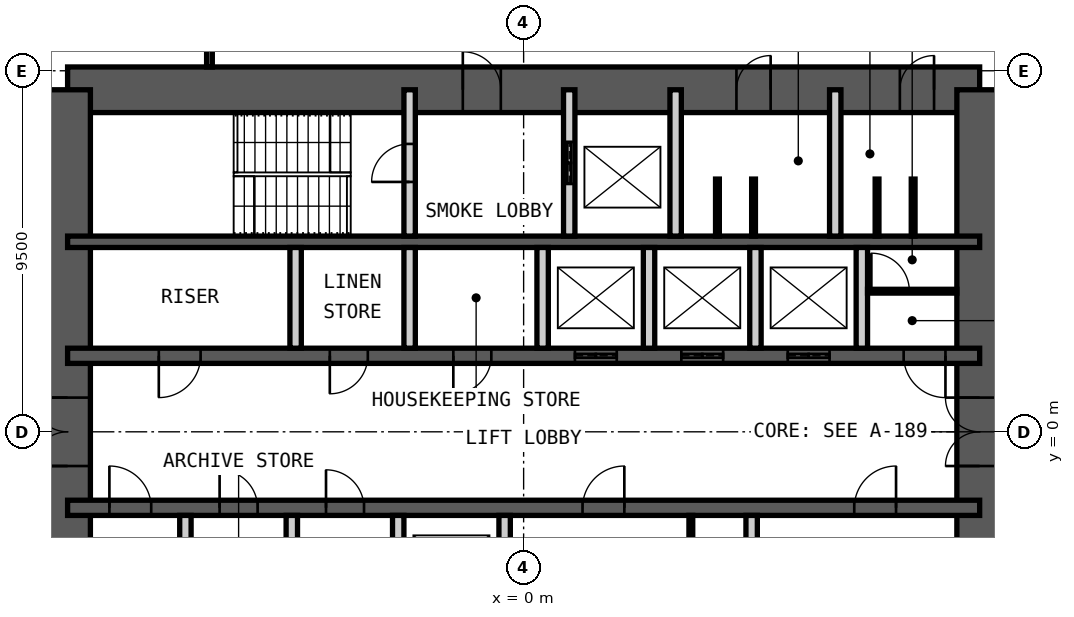
"""IFC4 building model, lengths in metres.
Left out: names, types, materials, properties, quantities, classifications, styles, units other than length and angle.
Written with IfcOpenShell. Run it as: python <this file> out.ifc"""

import sys

from ifc_helpers import new_model, si_unit, direction, frame, frame_2d, origin, place, context, subcontext, project, spatial, rectangle, extrude, element, fill, save


model = new_model("IFC4")
c1 = context("Model", 3, precision=1e-05, world=origin(), true_north=direction((0.0, 1.0)))
c2 = subcontext(c1, "Body", "Model", "MODEL_VIEW")
j1 = project(units=[si_unit("LENGTHUNIT", "METRE"), si_unit("PLANEANGLEUNIT", "RADIAN")], contexts=[c1])
p1 = place(None, origin())
s1 = spatial("IfcSite", under=j1, at=p1, CompositionType="ELEMENT")
p2 = place(p1, origin())
s2 = spatial("IfcBuilding", under=s1, at=p2, CompositionType="ELEMENT")
p3 = place(p2, frame((0.0, 0.0, 230.8)))
s3 = spatial("IfcBuildingStorey", under=s2, at=p3, CompositionType="ELEMENT", Elevation=230.8)
p4 = place(p3, frame((-12.0, 9.0, 0.0), z_axis=(0.0, 0.0, 1.0), x_axis=(1.0, 0.0, 0.0)))
e1 = element("IfcWall", 1, at=p4, inside=s3, PredefinedType="SHEAR", context=c2, shape_type="SweptSolid", body=[
    extrude(rectangle(XDim=24.0, YDim=1.2, at=frame_2d((12.0, 0.0))), origin(), (0.0, 0.0, 1.0), 4.2),
])
p5 = place(p4, frame((10.4, 0.0, 0.0)))
e2 = element("IfcOpeningElement", 2, at=p5, cuts=e1, PredefinedType="OPENING", context=c2, shape_type="SweptSolid", body=[
    extrude(rectangle(XDim=1.0, YDim=2.1, at=frame_2d((0.5, 1.05))), frame((0.0, 0.61, 0.0), z_axis=(0.0, -1.0, 0.0), x_axis=(1.0, 0.0, 0.0)), (0.0, 0.0, 1.0), 1.22),
])
p6 = place(p4, frame((17.6, 0.0, 0.0)))
e3 = element("IfcOpeningElement", 3, at=p6, cuts=e1, PredefinedType="OPENING", context=c2, shape_type="SweptSolid", body=[
    extrude(rectangle(XDim=0.9, YDim=2.1, at=frame_2d((0.45, 1.05))), frame((0.0, 0.61, 0.0), z_axis=(0.0, -1.0, 0.0), x_axis=(1.0, 0.0, 0.0)), (0.0, 0.0, 1.0), 1.22),
])
p7 = place(p4, frame((21.9, 0.0, 0.0)))
e4 = element("IfcOpeningElement", 4, at=p7, cuts=e1, PredefinedType="OPENING", context=c2, shape_type="SweptSolid", body=[
    extrude(rectangle(XDim=0.9, YDim=2.1, at=frame_2d((0.45, 1.05))), frame((0.0, 0.61, 0.0), z_axis=(0.0, -1.0, 0.0), x_axis=(1.0, 0.0, 0.0)), (0.0, 0.0, 1.0), 1.22),
])
p8 = place(p3, frame((12.0, -9.0, 0.0), z_axis=(0.0, 0.0, 1.0), x_axis=(0.0, 1.0, 0.0)))
e5 = element("IfcWall", 5, at=p8, inside=s3, PredefinedType="SHEAR", context=c2, shape_type="SweptSolid", body=[
    extrude(rectangle(XDim=18.0, YDim=1.2, at=frame_2d((9.0, 0.0))), origin(), (0.0, 0.0, 1.0), 4.2),
])
p9 = place(p8, frame((8.1, 0.0, 0.0)))
e6 = element("IfcOpeningElement", 6, at=p9, cuts=e5, PredefinedType="OPENING", context=c2, shape_type="SweptSolid", body=[
    extrude(rectangle(XDim=1.8, YDim=2.1, at=frame_2d((0.9, 1.05))), frame((0.0, 0.61, 0.0), z_axis=(0.0, -1.0, 0.0), x_axis=(1.0, 0.0, 0.0)), (0.0, 0.0, 1.0), 1.22),
])
p10 = place(p3, frame((-12.0, -9.0, 0.0), z_axis=(0.0, 0.0, 1.0), x_axis=(0.0, 1.0, 0.0)))
e7 = element("IfcWall", 7, at=p10, inside=s3, PredefinedType="SHEAR", context=c2, shape_type="SweptSolid", body=[
    extrude(rectangle(XDim=18.0, YDim=1.2, at=frame_2d((9.0, 0.0))), origin(), (0.0, 0.0, 1.0), 4.2),
])
p11 = place(p10, frame((8.1, 0.0, 0.0)))
e8 = element("IfcOpeningElement", 8, at=p11, cuts=e7, PredefinedType="OPENING", context=c2, shape_type="SweptSolid", body=[
    extrude(rectangle(XDim=1.8, YDim=2.1, at=frame_2d((0.9, 1.05))), frame((0.0, 0.61, 0.0), z_axis=(0.0, -1.0, 0.0), x_axis=(1.0, 0.0, 0.0)), (0.0, 0.0, 1.0), 1.22),
])
p12 = place(p3, frame((-12.0, 5.0, 0.0), z_axis=(0.0, 0.0, 1.0), x_axis=(1.0, 0.0, 0.0)))
e9 = element("IfcWall", 9, at=p12, inside=s3, PredefinedType="SHEAR", context=c2, shape_type="SweptSolid", body=[
    extrude(rectangle(XDim=24.0, YDim=0.3, at=frame_2d((12.0, 0.0))), origin(), (0.0, 0.0, 1.0), 4.2),
])
p13 = place(p3, frame((-12.0, 2.0, 0.0), z_axis=(0.0, 0.0, 1.0), x_axis=(1.0, 0.0, 0.0)))
e10 = element("IfcWall", 10, at=p13, inside=s3, PredefinedType="SHEAR", context=c2, shape_type="SweptSolid", body=[
    extrude(rectangle(XDim=24.0, YDim=0.4, at=frame_2d((12.0, 0.0))), origin(), (0.0, 0.0, 1.0), 4.2),
])
p14 = place(p13, frame((2.4, 0.0, 0.0)))
e11 = element("IfcOpeningElement", 11, at=p14, cuts=e10, PredefinedType="OPENING", context=c2, shape_type="SweptSolid", body=[
    extrude(rectangle(XDim=1.1, YDim=2.1, at=frame_2d((0.55, 1.05))), frame((0.0, 0.21, 0.0), z_axis=(0.0, -1.0, 0.0), x_axis=(1.0, 0.0, 0.0)), (0.0, 0.0, 1.0), 0.42),
])
p15 = place(p13, frame((22.0, 0.0, 0.0)))
e12 = element("IfcOpeningElement", 12, at=p15, cuts=e10, PredefinedType="OPENING", context=c2, shape_type="SweptSolid", body=[
    extrude(rectangle(XDim=1.1, YDim=2.1, at=frame_2d((0.55, 1.05))), frame((0.0, 0.21, 0.0), z_axis=(0.0, -1.0, 0.0), x_axis=(1.0, 0.0, 0.0)), (0.0, 0.0, 1.0), 0.42),
])
p16 = place(p13, frame((10.15, 0.0, 0.0)))
e13 = element("IfcOpeningElement", 13, at=p16, cuts=e10, PredefinedType="OPENING", context=c2, shape_type="SweptSolid", body=[
    extrude(rectangle(XDim=1.0, YDim=2.1, at=frame_2d((0.5, 1.05))), frame((0.0, 0.21, 0.0), z_axis=(0.0, -1.0, 0.0), x_axis=(1.0, 0.0, 0.0)), (0.0, 0.0, 1.0), 0.42),
])
p17 = place(p13, frame((6.9, 0.0, 0.0)))
e14 = element("IfcOpeningElement", 14, at=p17, cuts=e10, PredefinedType="OPENING", context=c2, shape_type="SweptSolid", body=[
    extrude(rectangle(XDim=1.0, YDim=2.1, at=frame_2d((0.5, 1.05))), frame((0.0, 0.21, 0.0), z_axis=(0.0, -1.0, 0.0), x_axis=(1.0, 0.0, 0.0)), (0.0, 0.0, 1.0), 0.42),
])
p18 = place(p13, frame((13.35, 0.0, 0.0)))
e15 = element("IfcOpeningElement", 15, at=p18, cuts=e10, PredefinedType="OPENING", context=c2, shape_type="SweptSolid", body=[
    extrude(rectangle(XDim=1.1, YDim=2.4, at=frame_2d((0.55, 1.2))), frame((0.0, 0.21, 0.0), z_axis=(0.0, -1.0, 0.0), x_axis=(1.0, 0.0, 0.0)), (0.0, 0.0, 1.0), 0.42),
])
p19 = place(p13, frame((16.15, 0.0, 0.0)))
e16 = element("IfcOpeningElement", 16, at=p19, cuts=e10, PredefinedType="OPENING", context=c2, shape_type="SweptSolid", body=[
    extrude(rectangle(XDim=1.1, YDim=2.4, at=frame_2d((0.55, 1.2))), frame((0.0, 0.21, 0.0), z_axis=(0.0, -1.0, 0.0), x_axis=(1.0, 0.0, 0.0)), (0.0, 0.0, 1.0), 0.42),
])
p20 = place(p13, frame((18.95, 0.0, 0.0)))
e17 = element("IfcOpeningElement", 17, at=p20, cuts=e10, PredefinedType="OPENING", context=c2, shape_type="SweptSolid", body=[
    extrude(rectangle(XDim=1.1, YDim=2.4, at=frame_2d((0.55, 1.2))), frame((0.0, 0.21, 0.0), z_axis=(0.0, -1.0, 0.0), x_axis=(1.0, 0.0, 0.0)), (0.0, 0.0, 1.0), 0.42),
])
p21 = place(p3, frame((-12.0, -2.0, 0.0), z_axis=(0.0, 0.0, 1.0), x_axis=(1.0, 0.0, 0.0)))
e18 = element("IfcWall", 18, at=p21, inside=s3, PredefinedType="SHEAR", context=c2, shape_type="SweptSolid", body=[
    extrude(rectangle(XDim=24.0, YDim=0.4, at=frame_2d((12.0, 0.0))), origin(), (0.0, 0.0, 1.0), 4.2),
])
p22 = place(p21, frame((1.1, 0.0, 0.0)))
e19 = element("IfcOpeningElement", 19, at=p22, cuts=e18, PredefinedType="OPENING", context=c2, shape_type="SweptSolid", body=[
    extrude(rectangle(XDim=1.1, YDim=2.1, at=frame_2d((0.55, 1.05))), frame((0.0, 0.21, 0.0), z_axis=(0.0, -1.0, 0.0), x_axis=(1.0, 0.0, 0.0)), (0.0, 0.0, 1.0), 0.42),
])
p23 = place(p21, frame((13.55, 0.0, 0.0)))
e20 = element("IfcOpeningElement", 20, at=p23, cuts=e18, PredefinedType="OPENING", context=c2, shape_type="SweptSolid", body=[
    extrude(rectangle(XDim=1.1, YDim=2.1, at=frame_2d((0.55, 1.05))), frame((0.0, 0.21, 0.0), z_axis=(0.0, -1.0, 0.0), x_axis=(1.0, 0.0, 0.0)), (0.0, 0.0, 1.0), 0.42),
])
p24 = place(p21, frame((20.7, 0.0, 0.0)))
e21 = element("IfcOpeningElement", 21, at=p24, cuts=e18, PredefinedType="OPENING", context=c2, shape_type="SweptSolid", body=[
    extrude(rectangle(XDim=1.1, YDim=2.1, at=frame_2d((0.55, 1.05))), frame((0.0, 0.21, 0.0), z_axis=(0.0, -1.0, 0.0), x_axis=(1.0, 0.0, 0.0)), (0.0, 0.0, 1.0), 0.42),
])
p25 = place(p21, frame((4.0, 0.0, 0.0)))
e22 = element("IfcOpeningElement", 22, at=p25, cuts=e18, PredefinedType="OPENING", context=c2, shape_type="SweptSolid", body=[
    extrude(rectangle(XDim=1.0, YDim=2.1, at=frame_2d((0.5, 1.05))), frame((0.0, 0.21, 0.0), z_axis=(0.0, -1.0, 0.0), x_axis=(1.0, 0.0, 0.0)), (0.0, 0.0, 1.0), 0.42),
])
p26 = place(p21, frame((6.8, 0.0, 0.0)))
e23 = element("IfcOpeningElement", 23, at=p26, cuts=e18, PredefinedType="OPENING", context=c2, shape_type="SweptSolid", body=[
    extrude(rectangle(XDim=1.0, YDim=2.1, at=frame_2d((0.5, 1.05))), frame((0.0, 0.21, 0.0), z_axis=(0.0, -1.0, 0.0), x_axis=(1.0, 0.0, 0.0)), (0.0, 0.0, 1.0), 0.42),
])
p27 = place(p3, frame((-3.0, 5.15, 0.0), z_axis=(0.0, 0.0, 1.0), x_axis=(0.0, 1.0, 0.0)))
e24 = element("IfcWall", 24, at=p27, inside=s3, PredefinedType="PARTITIONING", context=c2, shape_type="SweptSolid", body=[
    extrude(rectangle(XDim=3.85, YDim=0.3, at=frame_2d((1.925, 0.0))), origin(), (0.0, 0.0, 1.0), 3.98),
])
p28 = place(p27, frame((1.425, 0.0, 0.0)))
e25 = element("IfcOpeningElement", 25, at=p28, cuts=e24, PredefinedType="OPENING", context=c2, shape_type="SweptSolid", body=[
    extrude(rectangle(XDim=1.0, YDim=2.1, at=frame_2d((0.5, 1.05))), frame((0.0, 0.16, 0.0), z_axis=(0.0, -1.0, 0.0), x_axis=(1.0, 0.0, 0.0)), (0.0, 0.0, 1.0), 0.32),
])
p29 = place(p3, frame((1.2, 5.15, 0.0), z_axis=(0.0, 0.0, 1.0), x_axis=(0.0, 1.0, 0.0)))
e26 = element("IfcWall", 26, at=p29, inside=s3, PredefinedType="PARTITIONING", context=c2, shape_type="SweptSolid", body=[
    extrude(rectangle(XDim=3.85, YDim=0.3, at=frame_2d((1.925, 0.0))), origin(), (0.0, 0.0, 1.0), 3.98),
])
p30 = place(p29, frame((1.375, 0.0, 0.0)))
e27 = element("IfcOpeningElement", 27, at=p30, cuts=e26, PredefinedType="OPENING", context=c2, shape_type="SweptSolid", body=[
    extrude(rectangle(XDim=1.1, YDim=2.4, at=frame_2d((0.55, 1.2))), frame((0.0, 0.16, 0.0), z_axis=(0.0, -1.0, 0.0), x_axis=(1.0, 0.0, 0.0)), (0.0, 0.0, 1.0), 0.32),
])
for number, where, z_axis, x_axis in (
    (28, (4.0, 5.15, 0.0), (0.0, 0.0, 1.0), (0.0, 1.0, 0.0)),
    (29, (8.2, 5.15, 0.0), (0.0, 0.0, 1.0), (0.0, 1.0, 0.0)),
):
    element("IfcWall", number, at=place(p3, frame(where, z_axis=z_axis, x_axis=x_axis)), inside=s3, PredefinedType="PARTITIONING", context=c2, shape_type="SweptSolid", body=[
        extrude(rectangle(XDim=3.85, YDim=0.3, at=frame_2d((1.925, 0.0))), origin(), (0.0, 0.0, 1.0), 3.98),
    ])
for number, where, z_axis, x_axis in (
    (30, (-6.0, 2.2, 0.0), (0.0, 0.0, 1.0), (0.0, 1.0, 0.0)),
    (31, (-3.0, 2.2, 0.0), (0.0, 0.0, 1.0), (0.0, 1.0, 0.0)),
    (32, (0.5, 2.2, 0.0), (0.0, 0.0, 1.0), (0.0, 1.0, 0.0)),
    (33, (3.3, 2.2, 0.0), (0.0, 0.0, 1.0), (0.0, 1.0, 0.0)),
    (34, (6.1, 2.2, 0.0), (0.0, 0.0, 1.0), (0.0, 1.0, 0.0)),
    (35, (8.9, 2.2, 0.0), (0.0, 0.0, 1.0), (0.0, 1.0, 0.0)),
    (36, (-8.9, -4.85, 0.0), (0.0, 0.0, 1.0), (0.0, 1.0, 0.0)),
    (37, (-6.1, -4.85, 0.0), (0.0, 0.0, 1.0), (0.0, 1.0, 0.0)),
    (38, (-3.3, -4.85, 0.0), (0.0, 0.0, 1.0), (0.0, 1.0, 0.0)),
    (39, (-0.5, -4.85, 0.0), (0.0, 0.0, 1.0), (0.0, 1.0, 0.0)),
    (40, (6.0, -4.85, 0.0), (0.0, 0.0, 1.0), (0.0, 1.0, 0.0)),
):
    element("IfcWall", number, at=place(p3, frame(where, z_axis=z_axis, x_axis=x_axis)), inside=s3, PredefinedType="PARTITIONING", context=c2, shape_type="SweptSolid", body=[
        extrude(rectangle(XDim=2.65, YDim=0.3, at=frame_2d((1.325, 0.0))), origin(), (0.0, 0.0, 1.0), 3.98),
    ])
p31 = place(p3, frame((4.4, -4.85, 0.0), z_axis=(0.0, 0.0, 1.0), x_axis=(0.0, 1.0, 0.0)))
e41 = element("IfcWall", 41, at=p31, inside=s3, PredefinedType="PARTITIONING", context=c2, shape_type="SweptSolid", body=[
    extrude(rectangle(XDim=2.65, YDim=0.1, at=frame_2d((1.325, 0.0))), origin(), (0.0, 0.0, 1.0), 3.98),
])
p32 = place(p31, frame((0.1, 0.0, 0.0)))
e42 = element("IfcOpeningElement", 42, at=p32, cuts=e41, PredefinedType="OPENING", context=c2, shape_type="SweptSolid", body=[
    extrude(rectangle(XDim=1.0, YDim=2.4, at=frame_2d((0.5, 1.2))), frame((0.0, 0.06, 0.0), z_axis=(0.0, -1.0, 0.0), x_axis=(1.0, 0.0, 0.0)), (0.0, 0.0, 1.0), 0.12),
])
p33 = place(p3, frame((9.05, 3.7, 0.0), z_axis=(0.0, 0.0, 1.0), x_axis=(1.0, 0.0, 0.0)))
e43 = element("IfcWall", 43, at=p33, inside=s3, PredefinedType="PARTITIONING", context=c2, shape_type="SweptSolid", body=[
    extrude(rectangle(XDim=2.35, YDim=0.1, at=frame_2d((1.175, 0.0))), origin(), (0.0, 0.0, 1.0), 3.98),
])
p34 = place(p33, frame((0.1, 0.0, 0.0)))
e44 = element("IfcOpeningElement", 44, at=p34, cuts=e43, PredefinedType="OPENING", context=c2, shape_type="SweptSolid", body=[
    extrude(rectangle(XDim=1.0, YDim=2.4, at=frame_2d((0.5, 1.2))), frame((0.0, 0.06, 0.0), z_axis=(0.0, -1.0, 0.0), x_axis=(1.0, 0.0, 0.0)), (0.0, 0.0, 1.0), 0.12),
])
for number, where, z_axis, x_axis in (
    (45, (5.1, 5.15, 0.0), (0.0, 0.0, 1.0), (0.0, 1.0, 0.0)),
    (46, (6.05, 5.15, 0.0), (0.0, 0.0, 1.0), (0.0, 1.0, 0.0)),
    (47, (9.3, 5.15, 0.0), (0.0, 0.0, 1.0), (0.0, 1.0, 0.0)),
    (48, (10.25, 5.15, 0.0), (0.0, 0.0, 1.0), (0.0, 1.0, 0.0)),
):
    element("IfcWall", number, at=place(p3, frame(where, z_axis=z_axis, x_axis=x_axis)), inside=s3, PredefinedType="PARTITIONING", context=c2, shape_type="SweptSolid", body=[
        extrude(rectangle(XDim=1.5, YDim=0.1, at=frame_2d((0.75, 0.0))), origin(), (0.0, 0.0, 1.0), 2.1),
    ])
p35 = place(p3, frame((-8.267, 9.6, 0.0), z_axis=(0.0, 0.0, 1.0), x_axis=(0.0, 1.0, 0.0)))
e49 = element("IfcWall", 49, at=p35, inside=s3, PredefinedType="PARTITIONING", context=c2, shape_type="SweptSolid", body=[
    extrude(rectangle(XDim=1.875, YDim=0.15, at=frame_2d((0.938, 0.0))), origin(), (0.0, 0.0, 1.0), 4.03),
])
p36 = place(p5, origin())
e50 = element("IfcDoor", 50, at=p36, inside=s3, OperationType="SINGLE_SWING_RIGHT", PredefinedType="DOOR", context=c2, shape_type="SweptSolid", body=[
    extrude(rectangle(XDim=1.0, YDim=2.1, at=frame_2d((0.5, 1.05))), frame((0.0, 0.025, 0.0), z_axis=(0.0, -1.0, 0.0), x_axis=(1.0, 0.0, 0.0)), (0.0, 0.0, 1.0), 0.05),
])
fill(e2, e50)
p37 = place(p6, origin())
e51 = element("IfcDoor", 51, at=p37, inside=s3, OperationType="SINGLE_SWING_LEFT", PredefinedType="DOOR", context=c2, shape_type="SweptSolid", body=[
    extrude(rectangle(XDim=0.9, YDim=2.1, at=frame_2d((0.45, 1.05))), frame((0.0, 0.025, 0.0), z_axis=(0.0, -1.0, 0.0), x_axis=(1.0, 0.0, 0.0)), (0.0, 0.0, 1.0), 0.05),
])
fill(e3, e51)
p38 = place(p7, origin())
e52 = element("IfcDoor", 52, at=p38, inside=s3, OperationType="SINGLE_SWING_LEFT", PredefinedType="DOOR", context=c2, shape_type="SweptSolid", body=[
    extrude(rectangle(XDim=0.9, YDim=2.1, at=frame_2d((0.45, 1.05))), frame((0.0, 0.025, 0.0), z_axis=(0.0, -1.0, 0.0), x_axis=(1.0, 0.0, 0.0)), (0.0, 0.0, 1.0), 0.05),
])
fill(e4, e52)
p39 = place(p28, origin())
e53 = element("IfcDoor", 53, at=p39, inside=s3, OperationType="SINGLE_SWING_RIGHT", PredefinedType="DOOR", context=c2, shape_type="SweptSolid", body=[
    extrude(rectangle(XDim=1.0, YDim=2.1, at=frame_2d((0.5, 1.05))), frame((0.0, 0.025, 0.0), z_axis=(0.0, -1.0, 0.0), x_axis=(1.0, 0.0, 0.0)), (0.0, 0.0, 1.0), 0.05),
])
fill(e25, e53)
p40 = place(p14, origin())
e54 = element("IfcDoor", 54, at=p40, inside=s3, OperationType="SINGLE_SWING_LEFT", PredefinedType="DOOR", context=c2, shape_type="SweptSolid", body=[
    extrude(rectangle(XDim=1.1, YDim=2.1, at=frame_2d((0.55, 1.05))), frame((0.0, 0.025, 0.0), z_axis=(0.0, -1.0, 0.0), x_axis=(1.0, 0.0, 0.0)), (0.0, 0.0, 1.0), 0.05),
])
fill(e11, e54)
p41 = place(p22, origin())
e55 = element("IfcDoor", 55, at=p41, inside=s3, OperationType="SINGLE_SWING_RIGHT", PredefinedType="DOOR", context=c2, shape_type="SweptSolid", body=[
    extrude(rectangle(XDim=1.1, YDim=2.1, at=frame_2d((0.55, 1.05))), frame((0.0, 0.025, 0.0), z_axis=(0.0, -1.0, 0.0), x_axis=(1.0, 0.0, 0.0)), (0.0, 0.0, 1.0), 0.05),
])
fill(e19, e55)
p42 = place(p15, origin())
e56 = element("IfcDoor", 56, at=p42, inside=s3, OperationType="SINGLE_SWING_RIGHT", PredefinedType="DOOR", context=c2, shape_type="SweptSolid", body=[
    extrude(rectangle(XDim=1.1, YDim=2.1, at=frame_2d((0.55, 1.05))), frame((0.0, 0.025, 0.0), z_axis=(0.0, -1.0, 0.0), x_axis=(1.0, 0.0, 0.0)), (0.0, 0.0, 1.0), 0.05),
])
fill(e12, e56)
p43 = place(p16, origin())
e57 = element("IfcDoor", 57, at=p43, inside=s3, OperationType="SINGLE_SWING_LEFT", PredefinedType="DOOR", context=c2, shape_type="SweptSolid", body=[
    extrude(rectangle(XDim=1.0, YDim=2.1, at=frame_2d((0.5, 1.05))), frame((0.0, 0.025, 0.0), z_axis=(0.0, -1.0, 0.0), x_axis=(1.0, 0.0, 0.0)), (0.0, 0.0, 1.0), 0.05),
])
fill(e13, e57)
p44 = place(p23, origin())
e58 = element("IfcDoor", 58, at=p44, inside=s3, OperationType="SINGLE_SWING_LEFT", PredefinedType="DOOR", context=c2, shape_type="SweptSolid", body=[
    extrude(rectangle(XDim=1.1, YDim=2.1, at=frame_2d((0.55, 1.05))), frame((0.0, 0.025, 0.0), z_axis=(0.0, -1.0, 0.0), x_axis=(1.0, 0.0, 0.0)), (0.0, 0.0, 1.0), 0.05),
])
fill(e20, e58)
p45 = place(p24, origin())
e59 = element("IfcDoor", 59, at=p45, inside=s3, OperationType="SINGLE_SWING_LEFT", PredefinedType="DOOR", context=c2, shape_type="SweptSolid", body=[
    extrude(rectangle(XDim=1.1, YDim=2.1, at=frame_2d((0.55, 1.05))), frame((0.0, 0.025, 0.0), z_axis=(0.0, -1.0, 0.0), x_axis=(1.0, 0.0, 0.0)), (0.0, 0.0, 1.0), 0.05),
])
fill(e21, e59)
p46 = place(p9, origin())
e60 = element("IfcDoor", 60, at=p46, inside=s3, OperationType="DOUBLE_DOOR_DOUBLE_SWING", PredefinedType="DOOR", context=c2, shape_type="SweptSolid", body=[
    extrude(rectangle(XDim=1.8, YDim=2.1, at=frame_2d((0.9, 1.05))), frame((0.0, 0.025, 0.0), z_axis=(0.0, -1.0, 0.0), x_axis=(1.0, 0.0, 0.0)), (0.0, 0.0, 1.0), 0.05),
])
fill(e6, e60)
p47 = place(p11, origin())
e61 = element("IfcDoor", 61, at=p47, inside=s3, OperationType="DOUBLE_DOOR_DOUBLE_SWING", PredefinedType="DOOR", context=c2, shape_type="SweptSolid", body=[
    extrude(rectangle(XDim=1.8, YDim=2.1, at=frame_2d((0.9, 1.05))), frame((0.0, 0.025, 0.0), z_axis=(0.0, -1.0, 0.0), x_axis=(1.0, 0.0, 0.0)), (0.0, 0.0, 1.0), 0.05),
])
fill(e8, e61)
p48 = place(p30, origin())
e62 = element("IfcDoor", 62, at=p48, inside=s3, OperationType="DOUBLE_DOOR_SLIDING", PredefinedType="DOOR", context=c2, shape_type="SweptSolid", body=[
    extrude(rectangle(XDim=1.1, YDim=2.4, at=frame_2d((0.55, 1.2))), frame((0.0, 0.025, 0.0), z_axis=(0.0, -1.0, 0.0), x_axis=(1.0, 0.0, 0.0)), (0.0, 0.0, 1.0), 0.05),
])
fill(e27, e62)
p49 = place(p17, origin())
e63 = element("IfcDoor", 63, at=p49, inside=s3, OperationType="SINGLE_SWING_LEFT", PredefinedType="DOOR", context=c2, shape_type="SweptSolid", body=[
    extrude(rectangle(XDim=1.0, YDim=2.1, at=frame_2d((0.5, 1.05))), frame((0.0, 0.025, 0.0), z_axis=(0.0, -1.0, 0.0), x_axis=(1.0, 0.0, 0.0)), (0.0, 0.0, 1.0), 0.05),
])
fill(e14, e63)
p50 = place(p18, origin())
e64 = element("IfcDoor", 64, at=p50, inside=s3, OperationType="DOUBLE_DOOR_SLIDING", PredefinedType="DOOR", context=c2, shape_type="SweptSolid", body=[
    extrude(rectangle(XDim=1.1, YDim=2.4, at=frame_2d((0.55, 1.2))), frame((0.0, 0.025, 0.0), z_axis=(0.0, -1.0, 0.0), x_axis=(1.0, 0.0, 0.0)), (0.0, 0.0, 1.0), 0.05),
])
fill(e15, e64)
p51 = place(p19, origin())
e65 = element("IfcDoor", 65, at=p51, inside=s3, OperationType="DOUBLE_DOOR_SLIDING", PredefinedType="DOOR", context=c2, shape_type="SweptSolid", body=[
    extrude(rectangle(XDim=1.1, YDim=2.4, at=frame_2d((0.55, 1.2))), frame((0.0, 0.025, 0.0), z_axis=(0.0, -1.0, 0.0), x_axis=(1.0, 0.0, 0.0)), (0.0, 0.0, 1.0), 0.05),
])
fill(e16, e65)
p52 = place(p20, origin())
e66 = element("IfcDoor", 66, at=p52, inside=s3, OperationType="DOUBLE_DOOR_SLIDING", PredefinedType="DOOR", context=c2, shape_type="SweptSolid", body=[
    extrude(rectangle(XDim=1.1, YDim=2.4, at=frame_2d((0.55, 1.2))), frame((0.0, 0.025, 0.0), z_axis=(0.0, -1.0, 0.0), x_axis=(1.0, 0.0, 0.0)), (0.0, 0.0, 1.0), 0.05),
])
fill(e17, e66)
p53 = place(p25, origin())
e67 = element("IfcDoor", 67, at=p53, inside=s3, OperationType="SINGLE_SWING_RIGHT", PredefinedType="DOOR", context=c2, shape_type="SweptSolid", body=[
    extrude(rectangle(XDim=1.0, YDim=2.1, at=frame_2d((0.5, 1.05))), frame((0.0, 0.025, 0.0), z_axis=(0.0, -1.0, 0.0), x_axis=(1.0, 0.0, 0.0)), (0.0, 0.0, 1.0), 0.05),
])
fill(e22, e67)
p54 = place(p26, origin())
e68 = element("IfcDoor", 68, at=p54, inside=s3, OperationType="SINGLE_SWING_RIGHT", PredefinedType="DOOR", context=c2, shape_type="SweptSolid", body=[
    extrude(rectangle(XDim=1.0, YDim=2.1, at=frame_2d((0.5, 1.05))), frame((0.0, 0.025, 0.0), z_axis=(0.0, -1.0, 0.0), x_axis=(1.0, 0.0, 0.0)), (0.0, 0.0, 1.0), 0.05),
])
fill(e23, e68)
p55 = place(p34, origin())
e69 = element("IfcDoor", 69, at=p55, inside=s3, OperationType="SINGLE_SWING_RIGHT", PredefinedType="DOOR", context=c2, shape_type="SweptSolid", body=[
    extrude(rectangle(XDim=1.0, YDim=2.4, at=frame_2d((0.5, 1.2))), frame((0.0, 0.025, 0.0), z_axis=(0.0, -1.0, 0.0), x_axis=(1.0, 0.0, 0.0)), (0.0, 0.0, 1.0), 0.05),
])
fill(e44, e69)
save(model, sys.argv[1])
